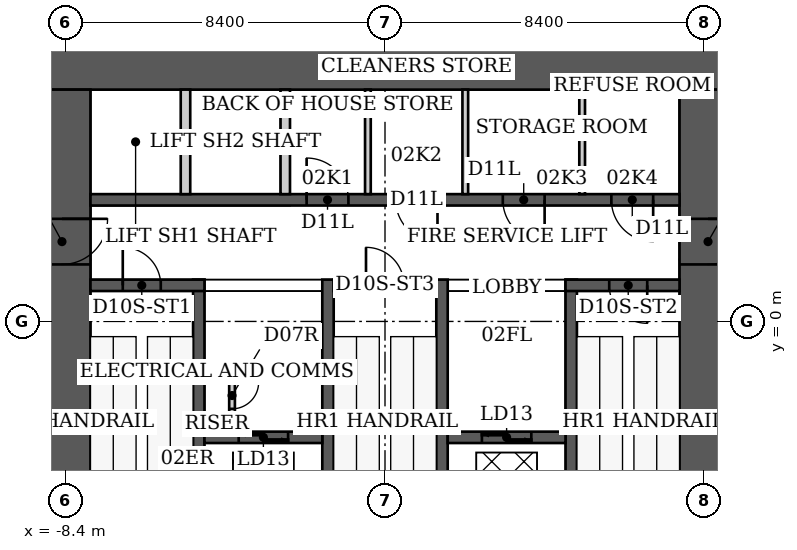
"""IFC4 building model, lengths in metres.
Left out: names, types, materials, properties, quantities, classifications, styles, units other than length and angle.
Written with IfcOpenShell. Run it as: python <this file> out.ifc"""

import sys

from ifc_helpers import new_model, si_unit, direction, frame, frame_2d, origin, place, context, subcontext, project, spatial, rectangle, extrude, element, fill, save


model = new_model("IFC4")
c1 = context("Model", 3, precision=1e-05, world=origin(), true_north=direction((0.0, 1.0)))
c2 = subcontext(c1, "Body", "Model", "MODEL_VIEW")
j1 = project(units=[si_unit("LENGTHUNIT", "METRE"), si_unit("PLANEANGLEUNIT", "RADIAN")], contexts=[c1])
p1 = place(None, origin())
s1 = spatial("IfcSite", under=j1, at=p1, CompositionType="ELEMENT")
p2 = place(p1, origin())
s2 = spatial("IfcBuilding", under=s1, at=p2, CompositionType="ELEMENT")
p3 = place(p2, frame((0.0, 0.0, 12.0)))
s3 = spatial("IfcBuildingStorey", under=s2, at=p3, CompositionType="ELEMENT", Elevation=12.0)
p4 = place(p3, frame((-9.25, 6.85, 0.0), z_axis=(0.0, 0.0, 1.0), x_axis=(1.0, 0.0, 0.0)))
e1 = element("IfcWall", 1, at=p4, inside=s3, PredefinedType="SHEAR", context=c2, shape_type="SweptSolid", body=[
    extrude(rectangle(XDim=18.5, YDim=1.5, at=frame_2d((9.25, 0.0))), origin(), (0.0, 0.0, 1.0), 6.0),
])
p5 = place(p3, frame((-8.5, -9.2, 0.0), z_axis=(0.0, 0.0, 1.0), x_axis=(0.0, 1.0, 0.0)))
e2 = element("IfcWall", 2, at=p5, inside=s3, PredefinedType="SHEAR", context=c2, shape_type="SweptSolid", body=[
    extrude(rectangle(XDim=15.3, YDim=1.5, at=frame_2d((7.65, 0.0))), origin(), (0.0, 0.0, 1.0), 6.0),
])
p6 = place(p5, frame((10.7, 0.0, 0.0)))
e3 = element("IfcOpeningElement", 3, at=p6, cuts=e2, PredefinedType="OPENING", context=c2, shape_type="SweptSolid", body=[
    extrude(rectangle(XDim=1.2, YDim=2.2, at=frame_2d((0.6, 1.1))), frame((0.0, 0.75, 0.0), z_axis=(0.0, -1.0, 0.0), x_axis=(1.0, 0.0, 0.0)), (0.0, 0.0, 1.0), 1.5),
])
p7 = place(p3, frame((8.5, -9.2, 0.0), z_axis=(0.0, 0.0, 1.0), x_axis=(0.0, 1.0, 0.0)))
e4 = element("IfcWall", 4, at=p7, inside=s3, PredefinedType="SHEAR", context=c2, shape_type="SweptSolid", body=[
    extrude(rectangle(XDim=15.3, YDim=1.5, at=frame_2d((7.65, 0.0))), origin(), (0.0, 0.0, 1.0), 6.0),
])
p8 = place(p7, frame((10.7, 0.0, 0.0)))
e5 = element("IfcOpeningElement", 5, at=p8, cuts=e4, PredefinedType="OPENING", context=c2, shape_type="SweptSolid", body=[
    extrude(rectangle(XDim=1.2, YDim=2.2, at=frame_2d((0.6, 1.1))), frame((0.0, 0.75, 0.0), z_axis=(0.0, -1.0, 0.0), x_axis=(1.0, 0.0, 0.0)), (0.0, 0.0, 1.0), 1.5),
])
for number, where, z_axis, x_axis in (
    (6, (-4.9, -6.1, 0.0), (0.0, 0.0, 1.0), (0.0, 1.0, 0.0)),
    (7, (-1.5, -6.1, 0.0), (0.0, 0.0, 1.0), (0.0, 1.0, 0.0)),
    (8, (1.5, -6.1, 0.0), (0.0, 0.0, 1.0), (0.0, 1.0, 0.0)),
    (9, (4.9, -6.1, 0.0), (0.0, 0.0, 1.0), (0.0, 1.0, 0.0)),
):
    element("IfcWall", number, at=place(p3, frame(where, z_axis=z_axis, x_axis=x_axis)), inside=s3, PredefinedType="SHEAR", context=c2, shape_type="SweptSolid", body=[
        extrude(rectangle(XDim=7.2, YDim=0.3, at=frame_2d((3.6, 0.0))), origin(), (0.0, 0.0, 1.0), 6.0),
    ])
p9 = place(p3, frame((-7.75, 0.95, 0.0), z_axis=(0.0, 0.0, 1.0), x_axis=(1.0, 0.0, 0.0)))
e10 = element("IfcWall", 10, at=p9, inside=s3, PredefinedType="SHEAR", context=c2, shape_type="SweptSolid", body=[
    extrude(rectangle(XDim=3.0, YDim=0.3, at=frame_2d((1.5, 0.0))), origin(), (0.0, 0.0, 1.0), 6.0),
])
p10 = place(p9, frame((0.85, 0.0, 0.0)))
e11 = element("IfcOpeningElement", 11, at=p10, cuts=e10, PredefinedType="OPENING", context=c2, shape_type="SweptSolid", body=[
    extrude(rectangle(XDim=1.0, YDim=2.2, at=frame_2d((0.5, 1.1))), frame((0.0, 0.15, 0.0), z_axis=(0.0, -1.0, 0.0), x_axis=(1.0, 0.0, 0.0)), (0.0, 0.0, 1.0), 0.3),
])
p11 = place(p3, frame((-1.35, 0.95, 0.0), z_axis=(0.0, 0.0, 1.0), x_axis=(1.0, 0.0, 0.0)))
e12 = element("IfcWall", 12, at=p11, inside=s3, PredefinedType="SHEAR", context=c2, shape_type="SweptSolid", body=[
    extrude(rectangle(XDim=2.7, YDim=0.3, at=frame_2d((1.35, 0.0))), origin(), (0.0, 0.0, 1.0), 6.0),
])
p12 = place(p11, frame((0.85, 0.0, 0.0)))
e13 = element("IfcOpeningElement", 13, at=p12, cuts=e12, PredefinedType="OPENING", context=c2, shape_type="SweptSolid", body=[
    extrude(rectangle(XDim=1.0, YDim=2.2, at=frame_2d((0.5, 1.1))), frame((0.0, 0.15, 0.0), z_axis=(0.0, -1.0, 0.0), x_axis=(1.0, 0.0, 0.0)), (0.0, 0.0, 1.0), 0.3),
])
p13 = place(p3, frame((4.75, 0.95, 0.0), z_axis=(0.0, 0.0, 1.0), x_axis=(1.0, 0.0, 0.0)))
e14 = element("IfcWall", 14, at=p13, inside=s3, PredefinedType="SHEAR", context=c2, shape_type="SweptSolid", body=[
    extrude(rectangle(XDim=3.0, YDim=0.3, at=frame_2d((1.5, 0.0))), origin(), (0.0, 0.0, 1.0), 6.0),
])
p14 = place(p13, frame((1.15, 0.0, 0.0)))
e15 = element("IfcOpeningElement", 15, at=p14, cuts=e14, PredefinedType="OPENING", context=c2, shape_type="SweptSolid", body=[
    extrude(rectangle(XDim=1.0, YDim=2.2, at=frame_2d((0.5, 1.1))), frame((0.0, 0.15, 0.0), z_axis=(0.0, -1.0, 0.0), x_axis=(1.0, 0.0, 0.0)), (0.0, 0.0, 1.0), 0.3),
])
p15 = place(p3, frame((-4.75, -3.05, 0.0), z_axis=(0.0, 0.0, 1.0), x_axis=(1.0, 0.0, 0.0)))
e16 = element("IfcWall", 16, at=p15, inside=s3, PredefinedType="SHEAR", context=c2, shape_type="SweptSolid", body=[
    extrude(rectangle(XDim=3.1, YDim=0.3, at=frame_2d((1.55, 0.0))), origin(), (0.0, 0.0, 1.0), 6.0),
])
p16 = place(p15, frame((0.9, 0.0, 0.0)))
e17 = element("IfcOpeningElement", 17, at=p16, cuts=e16, PredefinedType="OPENING", context=c2, shape_type="SweptSolid", body=[
    extrude(rectangle(XDim=1.3, YDim=2.1, at=frame_2d((0.65, 1.05))), frame((0.0, 0.15, 0.0), z_axis=(0.0, -1.0, 0.0), x_axis=(1.0, 0.0, 0.0)), (0.0, 0.0, 1.0), 0.3),
])
p17 = place(p3, frame((1.65, -3.05, 0.0), z_axis=(0.0, 0.0, 1.0), x_axis=(1.0, 0.0, 0.0)))
e18 = element("IfcWall", 18, at=p17, inside=s3, PredefinedType="SHEAR", context=c2, shape_type="SweptSolid", body=[
    extrude(rectangle(XDim=3.1, YDim=0.3, at=frame_2d((1.55, 0.0))), origin(), (0.0, 0.0, 1.0), 6.0),
])
p18 = place(p17, frame((0.9, 0.0, 0.0)))
e19 = element("IfcOpeningElement", 19, at=p18, cuts=e18, PredefinedType="OPENING", context=c2, shape_type="SweptSolid", body=[
    extrude(rectangle(XDim=1.3, YDim=2.1, at=frame_2d((0.65, 1.05))), frame((0.0, 0.15, 0.0), z_axis=(0.0, -1.0, 0.0), x_axis=(1.0, 0.0, 0.0)), (0.0, 0.0, 1.0), 0.3),
])
p19 = place(p3, frame((-7.75, 3.2, 0.0), z_axis=(0.0, 0.0, 1.0), x_axis=(1.0, 0.0, 0.0)))
e20 = element("IfcWall", 20, at=p19, inside=s3, PredefinedType="SHEAR", context=c2, shape_type="SweptSolid", body=[
    extrude(rectangle(XDim=15.5, YDim=0.3, at=frame_2d((7.75, 0.0))), origin(), (0.0, 0.0, 1.0), 6.0),
])
p20 = place(p19, frame((5.688, 0.0, 0.0)))
e21 = element("IfcOpeningElement", 21, at=p20, cuts=e20, PredefinedType="OPENING", context=c2, shape_type="SweptSolid", body=[
    extrude(rectangle(XDim=1.1, YDim=2.2, at=frame_2d((0.55, 1.1))), frame((0.0, 0.15, 0.0), z_axis=(0.0, -1.0, 0.0), x_axis=(1.0, 0.0, 0.0)), (0.0, 0.0, 1.0), 0.3),
])
p21 = place(p19, frame((8.031, 0.0, 0.0)))
e22 = element("IfcOpeningElement", 22, at=p21, cuts=e20, PredefinedType="OPENING", context=c2, shape_type="SweptSolid", body=[
    extrude(rectangle(XDim=1.1, YDim=2.2, at=frame_2d((0.55, 1.1))), frame((0.0, 0.15, 0.0), z_axis=(0.0, -1.0, 0.0), x_axis=(1.0, 0.0, 0.0)), (0.0, 0.0, 1.0), 0.3),
])
p22 = place(p19, frame((10.85, 0.0, 0.0)))
e23 = element("IfcOpeningElement", 23, at=p22, cuts=e20, PredefinedType="OPENING", context=c2, shape_type="SweptSolid", body=[
    extrude(rectangle(XDim=1.1, YDim=2.2, at=frame_2d((0.55, 1.1))), frame((0.0, 0.15, 0.0), z_axis=(0.0, -1.0, 0.0), x_axis=(1.0, 0.0, 0.0)), (0.0, 0.0, 1.0), 0.3),
])
p23 = place(p19, frame((13.706, 0.0, 0.0)))
e24 = element("IfcOpeningElement", 24, at=p23, cuts=e20, PredefinedType="OPENING", context=c2, shape_type="SweptSolid", body=[
    extrude(rectangle(XDim=1.1, YDim=2.2, at=frame_2d((0.55, 1.1))), frame((0.0, 0.15, 0.0), z_axis=(0.0, -1.0, 0.0), x_axis=(1.0, 0.0, 0.0)), (0.0, 0.0, 1.0), 0.3),
])
for number, where, z_axis, x_axis in (
    (25, (-5.25, 3.35, 0.0), (0.0, 0.0, 1.0), (0.0, 1.0, 0.0)),
    (26, (-2.625, 3.35, 0.0), (0.0, 0.0, 1.0), (0.0, 1.0, 0.0)),
):
    element("IfcWall", number, at=place(p3, frame(where, z_axis=z_axis, x_axis=x_axis)), inside=s3, PredefinedType="PARTITIONING", context=c2, shape_type="SweptSolid", body=[
        extrude(rectangle(XDim=2.75, YDim=0.25, at=frame_2d((1.375, 0.0))), origin(), (0.0, 0.0, 1.0), 6.0),
    ])
p24 = place(p3, frame((-4.025, -2.9, 0.0), z_axis=(0.0, 0.0, 1.0), x_axis=(0.0, 1.0, 0.0)))
e27 = element("IfcWall", 27, at=p24, inside=s3, PredefinedType="PARTITIONING", context=c2, shape_type="SweptSolid", body=[
    extrude(rectangle(XDim=1.775, YDim=0.15, at=frame_2d((0.887, 0.0))), origin(), (0.0, 0.0, 1.0), 5.84),
])
p25 = place(p24, frame((0.6, 0.0, 0.0)))
e28 = element("IfcOpeningElement", 28, at=p25, cuts=e27, PredefinedType="OPENING", context=c2, shape_type="SweptSolid", body=[
    extrude(rectangle(XDim=0.7, YDim=2.1, at=frame_2d((0.35, 1.05))), frame((0.0, 0.075, 0.0), z_axis=(0.0, -1.0, 0.0), x_axis=(1.0, 0.0, 0.0)), (0.0, 0.0, 1.0), 0.15),
])
p26 = place(p3, frame((-4.75, -1.2, 0.0), z_axis=(0.0, 0.0, 1.0), x_axis=(1.0, 0.0, 0.0)))
e29 = element("IfcWall", 29, at=p26, inside=s3, PredefinedType="PARTITIONING", context=c2, shape_type="SweptSolid", body=[
    extrude(rectangle(XDim=0.8, YDim=0.15, at=frame_2d((0.4, 0.0))), origin(), (0.0, 0.0, 1.0), 5.84),
])
for number, where, z_axis, x_axis in (
    (30, (-0.45, 3.35, 0.0), (0.0, 0.0, 1.0), (0.0, 1.0, 0.0)),
    (31, (2.113, 3.35, 0.0), (0.0, 0.0, 1.0), (0.0, 1.0, 0.0)),
    (32, (5.188, 3.35, 0.0), (0.0, 0.0, 1.0), (0.0, 1.0, 0.0)),
):
    element("IfcWall", number, at=place(p3, frame(where, z_axis=z_axis, x_axis=x_axis)), inside=s3, PredefinedType="PARTITIONING", context=c2, shape_type="SweptSolid", body=[
        extrude(rectangle(XDim=2.75, YDim=0.15, at=frame_2d((1.375, 0.0))), origin(), (0.0, 0.0, 1.0), 5.84),
    ])
p27 = place(p10, origin())
e33 = element("IfcDoor", 33, at=p27, inside=s3, OperationType="SINGLE_SWING_LEFT", PredefinedType="DOOR", context=c2, shape_type="SweptSolid", body=[
    extrude(rectangle(XDim=1.0, YDim=2.2, at=frame_2d((0.5, 1.1))), frame((0.0, 0.025, 0.0), z_axis=(0.0, -1.0, 0.0), x_axis=(1.0, 0.0, 0.0)), (0.0, 0.0, 1.0), 0.05),
])
fill(e11, e33)
p28 = place(p12, origin())
e34 = element("IfcDoor", 34, at=p28, inside=s3, OperationType="SINGLE_SWING_LEFT", PredefinedType="DOOR", context=c2, shape_type="SweptSolid", body=[
    extrude(rectangle(XDim=1.0, YDim=2.2, at=frame_2d((0.5, 1.1))), frame((0.0, 0.025, 0.0), z_axis=(0.0, -1.0, 0.0), x_axis=(1.0, 0.0, 0.0)), (0.0, 0.0, 1.0), 0.05),
])
fill(e13, e34)
p29 = place(p14, origin())
e35 = element("IfcDoor", 35, at=p29, inside=s3, OperationType="SINGLE_SWING_RIGHT", PredefinedType="DOOR", context=c2, shape_type="SweptSolid", body=[
    extrude(rectangle(XDim=1.0, YDim=2.2, at=frame_2d((0.5, 1.1))), frame((0.0, 0.025, 0.0), z_axis=(0.0, -1.0, 0.0), x_axis=(1.0, 0.0, 0.0)), (0.0, 0.0, 1.0), 0.05),
])
fill(e15, e35)
p30 = place(p6, origin())
e36 = element("IfcDoor", 36, at=p30, inside=s3, OperationType="SINGLE_SWING_RIGHT", PredefinedType="DOOR", context=c2, shape_type="SweptSolid", body=[
    extrude(rectangle(XDim=1.2, YDim=2.2, at=frame_2d((0.6, 1.1))), frame((0.0, 0.025, 0.0), z_axis=(0.0, -1.0, 0.0), x_axis=(1.0, 0.0, 0.0)), (0.0, 0.0, 1.0), 0.05),
])
fill(e3, e36)
p31 = place(p8, origin())
e37 = element("IfcDoor", 37, at=p31, inside=s3, OperationType="SINGLE_SWING_RIGHT", PredefinedType="DOOR", context=c2, shape_type="SweptSolid", body=[
    extrude(rectangle(XDim=1.2, YDim=2.2, at=frame_2d((0.6, 1.1))), frame((0.0, 0.025, 0.0), z_axis=(0.0, -1.0, 0.0), x_axis=(1.0, 0.0, 0.0)), (0.0, 0.0, 1.0), 0.05),
])
fill(e5, e37)
p32 = place(p25, origin())
e38 = element("IfcDoor", 38, at=p32, inside=s3, OperationType="SINGLE_SWING_RIGHT", PredefinedType="DOOR", context=c2, shape_type="SweptSolid", body=[
    extrude(rectangle(XDim=0.7, YDim=2.1, at=frame_2d((0.35, 1.05))), frame((0.0, 0.025, 0.0), z_axis=(0.0, -1.0, 0.0), x_axis=(1.0, 0.0, 0.0)), (0.0, 0.0, 1.0), 0.05),
])
fill(e28, e38)
p33 = place(p20, origin())
e39 = element("IfcDoor", 39, at=p33, inside=s3, OperationType="SINGLE_SWING_LEFT", PredefinedType="DOOR", context=c2, shape_type="SweptSolid", body=[
    extrude(rectangle(XDim=1.1, YDim=2.2, at=frame_2d((0.55, 1.1))), frame((0.0, 0.025, 0.0), z_axis=(0.0, -1.0, 0.0), x_axis=(1.0, 0.0, 0.0)), (0.0, 0.0, 1.0), 0.05),
])
fill(e21, e39)
p34 = place(p21, origin())
e40 = element("IfcDoor", 40, at=p34, inside=s3, OperationType="SINGLE_SWING_RIGHT", PredefinedType="DOOR", context=c2, shape_type="SweptSolid", body=[
    extrude(rectangle(XDim=1.1, YDim=2.2, at=frame_2d((0.55, 1.1))), frame((0.0, 0.025, 0.0), z_axis=(0.0, -1.0, 0.0), x_axis=(1.0, 0.0, 0.0)), (0.0, 0.0, 1.0), 0.05),
])
fill(e22, e40)
p35 = place(p22, origin())
e41 = element("IfcDoor", 41, at=p35, inside=s3, OperationType="SINGLE_SWING_RIGHT", PredefinedType="DOOR", context=c2, shape_type="SweptSolid", body=[
    extrude(rectangle(XDim=1.1, YDim=2.2, at=frame_2d((0.55, 1.1))), frame((0.0, 0.025, 0.0), z_axis=(0.0, -1.0, 0.0), x_axis=(1.0, 0.0, 0.0)), (0.0, 0.0, 1.0), 0.05),
])
fill(e23, e41)
p36 = place(p23, origin())
e42 = element("IfcDoor", 42, at=p36, inside=s3, OperationType="SINGLE_SWING_RIGHT", PredefinedType="DOOR", context=c2, shape_type="SweptSolid", body=[
    extrude(rectangle(XDim=1.1, YDim=2.2, at=frame_2d((0.55, 1.1))), frame((0.0, 0.025, 0.0), z_axis=(0.0, -1.0, 0.0), x_axis=(1.0, 0.0, 0.0)), (0.0, 0.0, 1.0), 0.05),
])
fill(e24, e42)
p37 = place(p16, origin())
e43 = element("IfcDoor", 43, at=p37, inside=s3, OperationType="DOUBLE_DOOR_SLIDING", PredefinedType="DOOR", context=c2, shape_type="SweptSolid", body=[
    extrude(rectangle(XDim=1.3, YDim=2.1, at=frame_2d((0.65, 1.05))), frame((0.0, 0.025, 0.0), z_axis=(0.0, -1.0, 0.0), x_axis=(1.0, 0.0, 0.0)), (0.0, 0.0, 1.0), 0.05),
])
fill(e17, e43)
p38 = place(p18, origin())
e44 = element("IfcDoor", 44, at=p38, inside=s3, OperationType="DOUBLE_DOOR_SLIDING", PredefinedType="DOOR", context=c2, shape_type="SweptSolid", body=[
    extrude(rectangle(XDim=1.3, YDim=2.1, at=frame_2d((0.65, 1.05))), frame((0.0, 0.025, 0.0), z_axis=(0.0, -1.0, 0.0), x_axis=(1.0, 0.0, 0.0)), (0.0, 0.0, 1.0), 0.05),
])
fill(e19, e44)
save(model, sys.argv[1])
